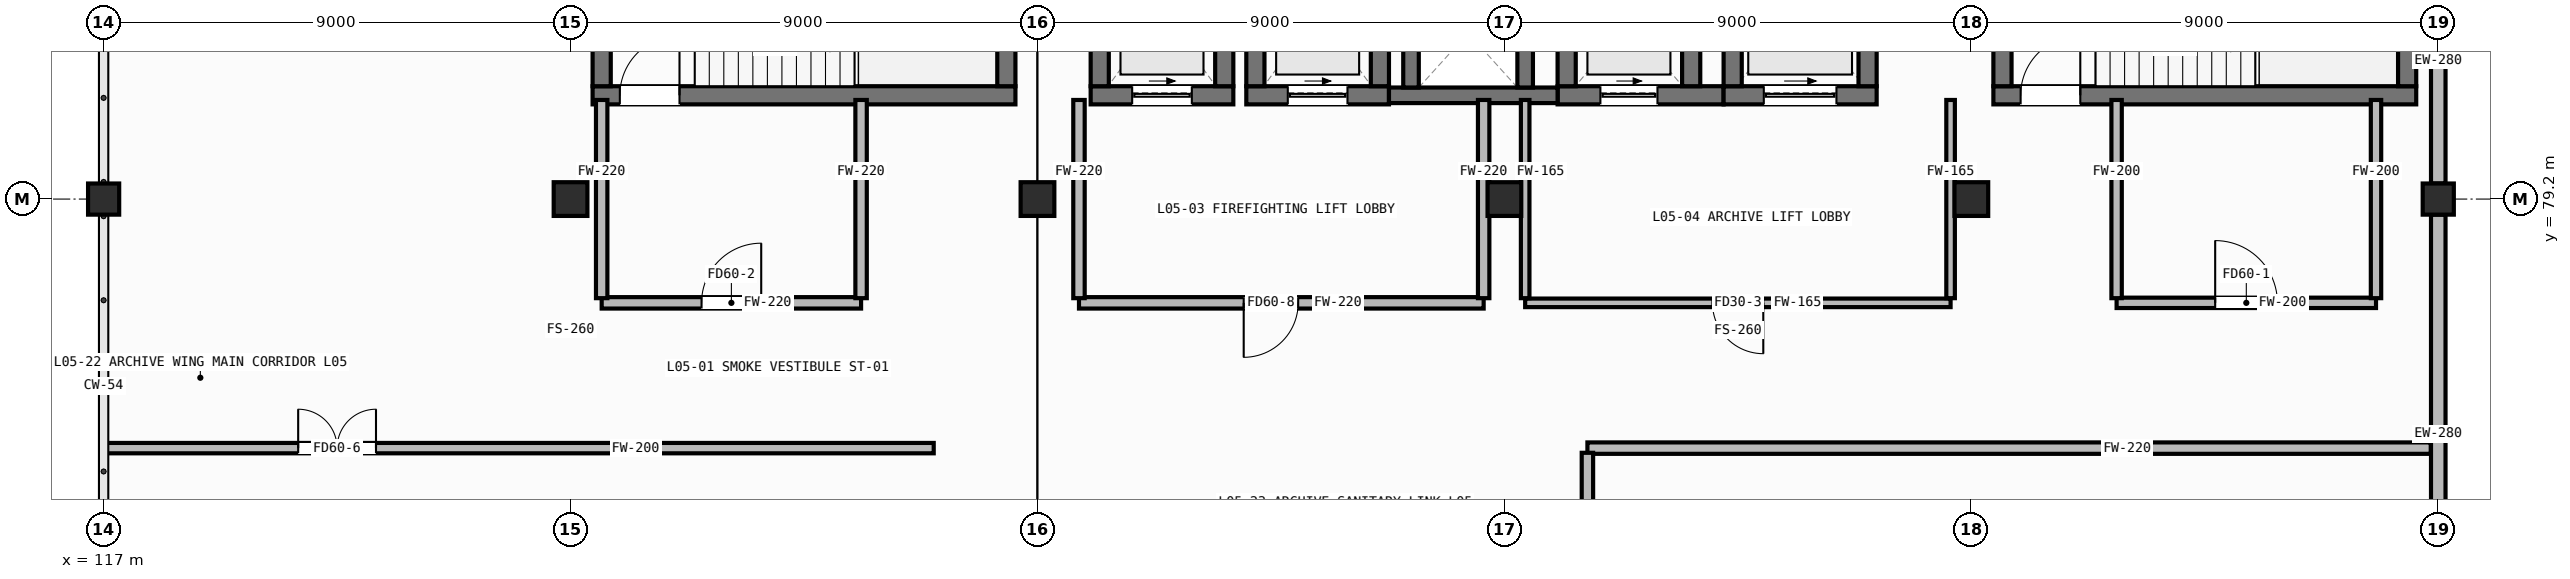
"""IFC4 building model, lengths in metres.
Left out: names, types, materials, properties, quantities, classifications, styles, units other than length and angle.
Written with IfcOpenShell. Run it as: python <this file> out.ifc"""

import sys

from ifc_helpers import new_model, si_unit, direction, frame, frame_2d, origin, origin_2d, place, context, subcontext, project, spatial, rectangle, hollow_rectangle, extrude, element, fill, save


model = new_model("IFC4")
c1 = context("Model", 3, precision=1e-05, world=origin(), true_north=direction((0.0, 1.0)))
c2 = subcontext(c1, "Body", "Model", "MODEL_VIEW")
j1 = project(units=[si_unit("LENGTHUNIT", "METRE"), si_unit("PLANEANGLEUNIT", "RADIAN")], contexts=[c1])
p1 = place(None, origin())
s1 = spatial("IfcSite", under=j1, at=p1, CompositionType="ELEMENT")
p2 = place(p1, origin())
s2 = spatial("IfcBuilding", under=s1, at=p2, CompositionType="ELEMENT")
p3 = place(p2, frame((0.0, 0.0, 17.0)))
s3 = spatial("IfcBuildingStorey", under=s2, at=p3, CompositionType="ELEMENT", Elevation=17.0)
p4 = place(p3, frame((117.0, 79.2, 0.0), z_axis=(0.0, 0.0, 1.0), x_axis=(1.0, 0.0, 0.0)))
e1 = element("IfcColumn", 1, at=p4, inside=s3, PredefinedType="COLUMN", context=c2, shape_type="SweptSolid", body=[
    extrude(hollow_rectangle(XDim=0.6, YDim=0.6, WallThickness=0.025, at=origin_2d()), origin(), (0.0, 0.0, 1.0), 3.6),
])
for number, where, z_axis, x_axis in (
    (2, (126.0, 79.2, 0.0), (0.0, 0.0, 1.0), (1.0, 0.0, 0.0)),
    (3, (135.0, 79.2, 0.0), (0.0, 0.0, 1.0), (1.0, 0.0, 0.0)),
    (4, (144.0, 79.2, 0.0), (0.0, 0.0, 1.0), (1.0, 0.0, 0.0)),
    (5, (153.0, 79.2, 0.0), (0.0, 0.0, 1.0), (1.0, 0.0, 0.0)),
):
    element("IfcColumn", number, at=place(p3, frame(where, z_axis=z_axis, x_axis=x_axis)), inside=s3, PredefinedType="COLUMN", context=c2, shape_type="SweptSolid", body=[
        extrude(hollow_rectangle(XDim=0.65, YDim=0.65, WallThickness=0.025, at=origin_2d()), origin(), (0.0, 0.0, 1.0), 3.6),
    ])
p5 = place(p3, frame((162.0, 79.2, 0.0), z_axis=(0.0, 0.0, 1.0), x_axis=(1.0, 0.0, 0.0)))
e6 = element("IfcColumn", 6, at=p5, inside=s3, PredefinedType="COLUMN", context=c2, shape_type="SweptSolid", body=[
    extrude(hollow_rectangle(XDim=0.6, YDim=0.6, WallThickness=0.025, at=origin_2d()), origin(), (0.0, 0.0, 1.0), 3.6),
])
p6 = place(p3, frame((162.0, 78.9, 0.0), z_axis=(0.0, 0.0, 1.0), x_axis=(0.0, -1.0, 0.0)))
e7 = element("IfcWall", 7, at=p6, inside=s3, PredefinedType="STANDARD", context=c2, shape_type="SweptSolid", body=[
    extrude(rectangle(XDim=6.6, YDim=0.28, at=frame_2d((3.3, 0.0))), origin(), (0.0, 0.0, 1.0), 2.94),
])
p7 = place(p3, frame((162.0, 86.1, 0.0), z_axis=(0.0, 0.0, 1.0), x_axis=(0.0, -1.0, 0.0)))
e8 = element("IfcWall", 8, at=p7, inside=s3, PredefinedType="STANDARD", context=c2, shape_type="SweptSolid", body=[
    extrude(rectangle(XDim=6.6, YDim=0.28, at=frame_2d((3.3, 0.0))), origin(), (0.0, 0.0, 1.0), 2.94),
])
p8 = place(p3, frame((126.425, 81.2, 0.0), z_axis=(0.0, 0.0, 1.0), x_axis=(1.0, 0.0, 0.0)))
e9 = element("IfcWall", 9, at=p8, inside=s3, PredefinedType="SHEAR", context=c2, shape_type="SweptSolid", body=[
    extrude(rectangle(XDim=8.15, YDim=0.35, at=frame_2d((4.075, 0.0))), origin(), (0.0, 0.0, 1.0), 3.34),
])
p9 = place(p8, frame((0.525, 0.0, 0.0)))
e10 = element("IfcOpeningElement", 10, at=p9, cuts=e9, PredefinedType="OPENING", context=c2, shape_type="SweptSolid", body=[
    extrude(rectangle(XDim=1.15, YDim=2.1, at=frame_2d((0.575, 1.05))), frame((0.0, 0.187, 0.0), z_axis=(0.0, -1.0, 0.0), x_axis=(1.0, 0.0, 0.0)), (0.0, 0.0, 1.0), 0.374),
])
for number, where, z_axis, x_axis in (
    (11, (126.6, 81.375, 0.0), (0.0, 0.0, 1.0), (0.0, 1.0, 0.0)),
    (12, (134.4, 81.375, 0.0), (0.0, 0.0, 1.0), (0.0, 1.0, 0.0)),
):
    element("IfcWall", number, at=place(p3, frame(where, z_axis=z_axis, x_axis=x_axis)), inside=s3, PredefinedType="SHEAR", context=c2, shape_type="SweptSolid", body=[
        extrude(rectangle(XDim=3.55, YDim=0.35, at=frame_2d((1.775, 0.0))), origin(), (0.0, 0.0, 1.0), 3.34),
    ])
p10 = place(p3, frame((153.425, 81.2, 0.0), z_axis=(0.0, 0.0, 1.0), x_axis=(1.0, 0.0, 0.0)))
e13 = element("IfcWall", 13, at=p10, inside=s3, PredefinedType="SHEAR", context=c2, shape_type="SweptSolid", body=[
    extrude(rectangle(XDim=8.15, YDim=0.35, at=frame_2d((4.075, 0.0))), origin(), (0.0, 0.0, 1.0), 3.34),
])
p11 = place(p10, frame((0.525, 0.0, 0.0)))
e14 = element("IfcOpeningElement", 14, at=p11, cuts=e13, PredefinedType="OPENING", context=c2, shape_type="SweptSolid", body=[
    extrude(rectangle(XDim=1.15, YDim=2.1, at=frame_2d((0.575, 1.05))), frame((0.0, 0.187, 0.0), z_axis=(0.0, -1.0, 0.0), x_axis=(1.0, 0.0, 0.0)), (0.0, 0.0, 1.0), 0.374),
])
for number, where, z_axis, x_axis in (
    (15, (153.6, 81.375, 0.0), (0.0, 0.0, 1.0), (0.0, 1.0, 0.0)),
    (16, (161.4, 81.375, 0.0), (0.0, 0.0, 1.0), (0.0, 1.0, 0.0)),
):
    element("IfcWall", number, at=place(p3, frame(where, z_axis=z_axis, x_axis=x_axis)), inside=s3, PredefinedType="SHEAR", context=c2, shape_type="SweptSolid", body=[
        extrude(rectangle(XDim=3.55, YDim=0.35, at=frame_2d((1.775, 0.0))), origin(), (0.0, 0.0, 1.0), 3.34),
    ])
p12 = place(p3, frame((136.025, 81.2, 0.0), z_axis=(0.0, 0.0, 1.0), x_axis=(1.0, 0.0, 0.0)))
e17 = element("IfcWall", 17, at=p12, inside=s3, PredefinedType="SHEAR", context=c2, shape_type="SweptSolid", body=[
    extrude(rectangle(XDim=2.75, YDim=0.35, at=frame_2d((1.375, 0.0))), origin(), (0.0, 0.0, 1.0), 3.34),
])
p13 = place(p12, frame((0.8, 0.0, 0.0)))
e18 = element("IfcOpeningElement", 18, at=p13, cuts=e17, PredefinedType="OPENING", context=c2, shape_type="SweptSolid", body=[
    extrude(rectangle(XDim=1.15, YDim=2.12, at=frame_2d((0.575, 1.06))), frame((0.0, 0.187, 0.0), z_axis=(0.0, -1.0, 0.0), x_axis=(1.0, 0.0, 0.0)), (0.0, 0.0, 1.0), 0.374),
])
for number, where, z_axis, x_axis in (
    (19, (136.2, 81.375, 0.0), (0.0, 0.0, 1.0), (0.0, 1.0, 0.0)),
    (20, (138.6, 81.375, 0.0), (0.0, 0.0, 1.0), (0.0, 1.0, 0.0)),
):
    element("IfcWall", number, at=place(p3, frame(where, z_axis=z_axis, x_axis=x_axis)), inside=s3, PredefinedType="SHEAR", context=c2, shape_type="SweptSolid", body=[
        extrude(rectangle(XDim=2.85, YDim=0.35, at=frame_2d((1.425, 0.0))), origin(), (0.0, 0.0, 1.0), 3.34),
    ])
p14 = place(p3, frame((139.025, 81.2, 0.0), z_axis=(0.0, 0.0, 1.0), x_axis=(1.0, 0.0, 0.0)))
e21 = element("IfcWall", 21, at=p14, inside=s3, PredefinedType="SHEAR", context=c2, shape_type="SweptSolid", body=[
    extrude(rectangle(XDim=2.75, YDim=0.35, at=frame_2d((1.375, 0.0))), origin(), (0.0, 0.0, 1.0), 3.34),
])
p15 = place(p14, frame((0.8, 0.0, 0.0)))
e22 = element("IfcOpeningElement", 22, at=p15, cuts=e21, PredefinedType="OPENING", context=c2, shape_type="SweptSolid", body=[
    extrude(rectangle(XDim=1.15, YDim=2.12, at=frame_2d((0.575, 1.06))), frame((0.0, 0.187, 0.0), z_axis=(0.0, -1.0, 0.0), x_axis=(1.0, 0.0, 0.0)), (0.0, 0.0, 1.0), 0.374),
])
for number, where, z_axis, x_axis in (
    (23, (139.2, 81.375, 0.0), (0.0, 0.0, 1.0), (0.0, 1.0, 0.0)),
    (24, (141.6, 81.375, 0.0), (0.0, 0.0, 1.0), (0.0, 1.0, 0.0)),
):
    element("IfcWall", number, at=place(p3, frame(where, z_axis=z_axis, x_axis=x_axis)), inside=s3, PredefinedType="SHEAR", context=c2, shape_type="SweptSolid", body=[
        extrude(rectangle(XDim=2.85, YDim=0.35, at=frame_2d((1.425, 0.0))), origin(), (0.0, 0.0, 1.0), 3.34),
    ])
p16 = place(p3, frame((145.025, 81.2, 0.0), z_axis=(0.0, 0.0, 1.0), x_axis=(1.0, 0.0, 0.0)))
e25 = element("IfcWall", 25, at=p16, inside=s3, PredefinedType="SHEAR", context=c2, shape_type="SweptSolid", body=[
    extrude(rectangle(XDim=3.2, YDim=0.35, at=frame_2d((1.6, 0.0))), origin(), (0.0, 0.0, 1.0), 3.34),
])
p17 = place(p16, frame((0.825, 0.0, 0.0)))
e26 = element("IfcOpeningElement", 26, at=p17, cuts=e25, PredefinedType="OPENING", context=c2, shape_type="SweptSolid", body=[
    extrude(rectangle(XDim=1.1, YDim=2.1, at=frame_2d((0.55, 1.05))), frame((0.0, 0.187, 0.0), z_axis=(0.0, -1.0, 0.0), x_axis=(1.0, 0.0, 0.0)), (0.0, 0.0, 1.0), 0.374),
])
for number, where, z_axis, x_axis in (
    (27, (145.2, 81.375, 0.0), (0.0, 0.0, 1.0), (0.0, 1.0, 0.0)),
    (28, (147.6, 81.375, 0.0), (0.0, 0.0, 1.0), (0.0, 1.0, 0.0)),
):
    element("IfcWall", number, at=place(p3, frame(where, z_axis=z_axis, x_axis=x_axis)), inside=s3, PredefinedType="SHEAR", context=c2, shape_type="SweptSolid", body=[
        extrude(rectangle(XDim=2.45, YDim=0.35, at=frame_2d((1.225, 0.0))), origin(), (0.0, 0.0, 1.0), 3.34),
    ])
p18 = place(p3, frame((148.225, 81.2, 0.0), z_axis=(0.0, 0.0, 1.0), x_axis=(1.0, 0.0, 0.0)))
e29 = element("IfcWall", 29, at=p18, inside=s3, PredefinedType="SHEAR", context=c2, shape_type="SweptSolid", body=[
    extrude(rectangle(XDim=2.95, YDim=0.35, at=frame_2d((1.475, 0.0))), origin(), (0.0, 0.0, 1.0), 3.34),
])
p19 = place(p18, frame((0.775, 0.0, 0.0)))
e30 = element("IfcOpeningElement", 30, at=p19, cuts=e29, PredefinedType="OPENING", context=c2, shape_type="SweptSolid", body=[
    extrude(rectangle(XDim=1.4, YDim=2.15, at=frame_2d((0.7, 1.075))), frame((0.0, 0.187, 0.0), z_axis=(0.0, -1.0, 0.0), x_axis=(1.0, 0.0, 0.0)), (0.0, 0.0, 1.0), 0.374),
])
for number, where, z_axis, x_axis in (
    (31, (148.4, 81.375, 0.0), (0.0, 0.0, 1.0), (0.0, 1.0, 0.0)),
    (32, (151.0, 81.375, 0.0), (0.0, 0.0, 1.0), (0.0, 1.0, 0.0)),
):
    element("IfcWall", number, at=place(p3, frame(where, z_axis=z_axis, x_axis=x_axis)), inside=s3, PredefinedType="SHEAR", context=c2, shape_type="SweptSolid", body=[
        extrude(rectangle(XDim=3.05, YDim=0.35, at=frame_2d((1.525, 0.0))), origin(), (0.0, 0.0, 1.0), 3.34),
    ])
p20 = place(p3, frame((141.775, 81.2, 0.0), z_axis=(0.0, 0.0, 1.0), x_axis=(1.0, 0.0, 0.0)))
e33 = element("IfcWall", 33, at=p20, inside=s3, PredefinedType="SHEAR", context=c2, shape_type="SweptSolid", body=[
    extrude(rectangle(XDim=3.25, YDim=0.3, at=frame_2d((1.625, 0.0))), origin(), (0.0, 0.0, 1.0), 3.34),
])
for number, where, z_axis, x_axis in (
    (34, (142.2, 81.35, 0.0), (0.0, 0.0, 1.0), (0.0, 1.0, 0.0)),
    (35, (144.4, 81.35, 0.0), (0.0, 0.0, 1.0), (0.0, 1.0, 0.0)),
):
    element("IfcWall", number, at=place(p3, frame(where, z_axis=z_axis, x_axis=x_axis)), inside=s3, PredefinedType="SHEAR", context=c2, shape_type="SweptSolid", body=[
        extrude(rectangle(XDim=2.1, YDim=0.3, at=frame_2d((1.05, 0.0))), origin(), (0.0, 0.0, 1.0), 3.34),
    ])
p21 = place(p3, frame((126.6, 77.2, 0.0), z_axis=(0.0, 0.0, 1.0), x_axis=(1.0, 0.0, 0.0)))
e36 = element("IfcWall", 36, at=p21, inside=s3, PredefinedType="PARTITIONING", context=c2, shape_type="SweptSolid", body=[
    extrude(rectangle(XDim=5.0, YDim=0.22, at=frame_2d((2.5, 0.0))), origin(), (0.0, 0.0, 1.0), 3.34),
])
p22 = place(p21, frame((1.925, 0.0, 0.0)))
e37 = element("IfcOpeningElement", 37, at=p22, cuts=e36, PredefinedType="OPENING", context=c2, shape_type="SweptSolid", body=[
    extrude(rectangle(XDim=1.15, YDim=2.1, at=frame_2d((0.575, 1.05))), frame((0.0, 0.122, 0.0), z_axis=(0.0, -1.0, 0.0), x_axis=(1.0, 0.0, 0.0)), (0.0, 0.0, 1.0), 0.244),
])
for number, where, z_axis, x_axis in (
    (38, (126.6, 77.29, 0.0), (0.0, 0.0, 1.0), (0.0, 1.0, 0.0)),
    (39, (131.6, 77.29, 0.0), (0.0, 0.0, 1.0), (0.0, 1.0, 0.0)),
):
    element("IfcWall", number, at=place(p3, frame(where, z_axis=z_axis, x_axis=x_axis)), inside=s3, PredefinedType="PARTITIONING", context=c2, shape_type="SweptSolid", body=[
        extrude(rectangle(XDim=3.82, YDim=0.22, at=frame_2d((1.91, 0.0))), origin(), (0.0, 0.0, 1.0), 3.34),
    ])
p23 = place(p3, frame((155.8, 77.2, 0.0), z_axis=(0.0, 0.0, 1.0), x_axis=(1.0, 0.0, 0.0)))
e40 = element("IfcWall", 40, at=p23, inside=s3, PredefinedType="PARTITIONING", context=c2, shape_type="SweptSolid", body=[
    extrude(rectangle(XDim=5.0, YDim=0.2, at=frame_2d((2.5, 0.0))), origin(), (0.0, 0.0, 1.0), 3.34),
])
p24 = place(p23, frame((1.9, 0.0, 0.0)))
e41 = element("IfcOpeningElement", 41, at=p24, cuts=e40, PredefinedType="OPENING", context=c2, shape_type="SweptSolid", body=[
    extrude(rectangle(XDim=1.2, YDim=2.1, at=frame_2d((0.6, 1.05))), frame((0.0, 0.112, 0.0), z_axis=(0.0, -1.0, 0.0), x_axis=(1.0, 0.0, 0.0)), (0.0, 0.0, 1.0), 0.224),
])
for number, where, z_axis, x_axis in (
    (42, (155.8, 77.29, 0.0), (0.0, 0.0, 1.0), (0.0, 1.0, 0.0)),
    (43, (160.8, 77.29, 0.0), (0.0, 0.0, 1.0), (0.0, 1.0, 0.0)),
):
    element("IfcWall", number, at=place(p3, frame(where, z_axis=z_axis, x_axis=x_axis)), inside=s3, PredefinedType="PARTITIONING", context=c2, shape_type="SweptSolid", body=[
        extrude(rectangle(XDim=3.82, YDim=0.2, at=frame_2d((1.91, 0.0))), origin(), (0.0, 0.0, 1.0), 3.34),
    ])
p25 = place(p3, frame((135.8, 77.2, 0.0), z_axis=(0.0, 0.0, 1.0), x_axis=(1.0, 0.0, 0.0)))
e44 = element("IfcWall", 44, at=p25, inside=s3, PredefinedType="PARTITIONING", context=c2, shape_type="SweptSolid", body=[
    extrude(rectangle(XDim=7.8, YDim=0.22, at=frame_2d((3.9, 0.0))), origin(), (0.0, 0.0, 1.0), 3.34),
])
p26 = place(p25, frame((3.175, 0.0, 0.0)))
e45 = element("IfcOpeningElement", 45, at=p26, cuts=e44, PredefinedType="OPENING", context=c2, shape_type="SweptSolid", body=[
    extrude(rectangle(XDim=1.05, YDim=2.02, at=frame_2d((0.525, 1.01))), frame((0.0, 0.122, 0.0), z_axis=(0.0, -1.0, 0.0), x_axis=(1.0, 0.0, 0.0)), (0.0, 0.0, 1.0), 0.244),
])
for number, where, z_axis, x_axis in (
    (46, (135.8, 77.29, 0.0), (0.0, 0.0, 1.0), (0.0, 1.0, 0.0)),
    (47, (143.6, 77.29, 0.0), (0.0, 0.0, 1.0), (0.0, 1.0, 0.0)),
):
    element("IfcWall", number, at=place(p3, frame(where, z_axis=z_axis, x_axis=x_axis)), inside=s3, PredefinedType="PARTITIONING", context=c2, shape_type="SweptSolid", body=[
        extrude(rectangle(XDim=3.82, YDim=0.22, at=frame_2d((1.91, 0.0))), origin(), (0.0, 0.0, 1.0), 3.34),
    ])
p27 = place(p3, frame((144.4, 77.2, 0.0), z_axis=(0.0, 0.0, 1.0), x_axis=(1.0, 0.0, 0.0)))
e48 = element("IfcWall", 48, at=p27, inside=s3, PredefinedType="PARTITIONING", context=c2, shape_type="SweptSolid", body=[
    extrude(rectangle(XDim=8.2, YDim=0.165, at=frame_2d((4.1, 0.0))), origin(), (0.0, 0.0, 1.0), 3.34),
])
p28 = place(p27, frame((3.61, 0.0, 0.0)))
e49 = element("IfcOpeningElement", 49, at=p28, cuts=e48, PredefinedType="OPENING", context=c2, shape_type="SweptSolid", body=[
    extrude(rectangle(XDim=0.98, YDim=2.02, at=frame_2d((0.49, 1.01))), frame((0.0, 0.094, 0.0), z_axis=(0.0, -1.0, 0.0), x_axis=(1.0, 0.0, 0.0)), (0.0, 0.0, 1.0), 0.189),
])
for number, where, z_axis, x_axis in (
    (50, (144.4, 77.29, 0.0), (0.0, 0.0, 1.0), (0.0, 1.0, 0.0)),
    (51, (152.6, 77.29, 0.0), (0.0, 0.0, 1.0), (0.0, 1.0, 0.0)),
):
    element("IfcWall", number, at=place(p3, frame(where, z_axis=z_axis, x_axis=x_axis)), inside=s3, PredefinedType="PARTITIONING", context=c2, shape_type="SweptSolid", body=[
        extrude(rectangle(XDim=3.82, YDim=0.165, at=frame_2d((1.91, 0.0))), origin(), (0.0, 0.0, 1.0), 3.34),
    ])
p29 = place(p3, frame((117.035, 74.4, 0.0), z_axis=(0.0, 0.0, 1.0), x_axis=(1.0, 0.0, 0.0)))
e52 = element("IfcWall", 52, at=p29, inside=s3, PredefinedType="PARTITIONING", context=c2, shape_type="SweptSolid", body=[
    extrude(rectangle(XDim=15.965, YDim=0.2, at=frame_2d((7.982, 0.0))), origin(), (0.0, 0.0, 1.0), 3.34),
])
p30 = place(p29, frame((3.715, 0.0, 0.0)))
e53 = element("IfcOpeningElement", 53, at=p30, cuts=e52, PredefinedType="OPENING", context=c2, shape_type="SweptSolid", body=[
    extrude(rectangle(XDim=1.5, YDim=2.1, at=frame_2d((0.75, 1.05))), frame((0.0, 0.112, 0.0), z_axis=(0.0, -1.0, 0.0), x_axis=(1.0, 0.0, 0.0)), (0.0, 0.0, 1.0), 0.224),
])
p31 = place(p3, frame((145.6, 74.4, 0.0), z_axis=(0.0, 0.0, 1.0), x_axis=(1.0, 0.0, 0.0)))
e54 = element("IfcWall", 54, at=p31, inside=s3, PredefinedType="PARTITIONING", context=c2, shape_type="SweptSolid", body=[
    extrude(rectangle(XDim=16.255, YDim=0.22, at=frame_2d((8.127, 0.0))), origin(), (0.0, 0.0, 1.0), 3.34),
])
p32 = place(p3, frame((145.6, 50.435, 0.0), z_axis=(0.0, 0.0, 1.0), x_axis=(0.0, 1.0, 0.0)))
e55 = element("IfcWall", 55, at=p32, inside=s3, PredefinedType="PARTITIONING", context=c2, shape_type="SweptSolid", body=[
    extrude(rectangle(XDim=23.875, YDim=0.22, at=frame_2d((11.938, 0.0))), origin(), (0.0, 0.0, 1.0), 3.34),
])
p33 = place(p32, frame((15.165, 0.0, 0.0)))
e56 = element("IfcOpeningElement", 56, at=p33, cuts=e55, PredefinedType="OPENING", context=c2, shape_type="SweptSolid", body=[
    extrude(rectangle(XDim=1.6, YDim=2.12, at=frame_2d((0.8, 1.06))), frame((0.0, 0.122, 0.0), z_axis=(0.0, -1.0, 0.0), x_axis=(1.0, 0.0, 0.0)), (0.0, 0.0, 1.0), 0.244),
])
p34 = place(p9, origin())
e57 = element("IfcDoor", 57, at=p34, inside=s3, OperationType="SINGLE_SWING_RIGHT", PredefinedType="DOOR", context=c2, shape_type="SweptSolid", body=[
    extrude(rectangle(XDim=1.15, YDim=2.1, at=frame_2d((0.575, 1.05))), frame((0.0, 0.025, 0.0), z_axis=(0.0, -1.0, 0.0), x_axis=(1.0, 0.0, 0.0)), (0.0, 0.0, 1.0), 0.05),
])
fill(e10, e57)
p35 = place(p11, origin())
e58 = element("IfcDoor", 58, at=p35, inside=s3, OperationType="SINGLE_SWING_RIGHT", PredefinedType="DOOR", context=c2, shape_type="SweptSolid", body=[
    extrude(rectangle(XDim=1.15, YDim=2.1, at=frame_2d((0.575, 1.05))), frame((0.0, 0.025, 0.0), z_axis=(0.0, -1.0, 0.0), x_axis=(1.0, 0.0, 0.0)), (0.0, 0.0, 1.0), 0.05),
])
fill(e14, e58)
p36 = place(p13, origin())
e59 = element("IfcDoor", 59, at=p36, inside=s3, OperationType="SLIDING_TO_LEFT", PredefinedType="DOOR", context=c2, shape_type="SweptSolid", body=[
    extrude(rectangle(XDim=1.15, YDim=2.12, at=frame_2d((0.575, 1.06))), frame((0.0, 0.025, 0.0), z_axis=(0.0, -1.0, 0.0), x_axis=(1.0, 0.0, 0.0)), (0.0, 0.0, 1.0), 0.05),
])
fill(e18, e59)
p37 = place(p15, origin())
e60 = element("IfcDoor", 60, at=p37, inside=s3, OperationType="SLIDING_TO_LEFT", PredefinedType="DOOR", context=c2, shape_type="SweptSolid", body=[
    extrude(rectangle(XDim=1.15, YDim=2.12, at=frame_2d((0.575, 1.06))), frame((0.0, 0.025, 0.0), z_axis=(0.0, -1.0, 0.0), x_axis=(1.0, 0.0, 0.0)), (0.0, 0.0, 1.0), 0.05),
])
fill(e22, e60)
p38 = place(p17, origin())
e61 = element("IfcDoor", 61, at=p38, inside=s3, OperationType="SLIDING_TO_LEFT", PredefinedType="DOOR", context=c2, shape_type="SweptSolid", body=[
    extrude(rectangle(XDim=1.1, YDim=2.1, at=frame_2d((0.55, 1.05))), frame((0.0, 0.025, 0.0), z_axis=(0.0, -1.0, 0.0), x_axis=(1.0, 0.0, 0.0)), (0.0, 0.0, 1.0), 0.05),
])
fill(e26, e61)
p39 = place(p19, origin())
e62 = element("IfcDoor", 62, at=p39, inside=s3, OperationType="SLIDING_TO_LEFT", PredefinedType="DOOR", context=c2, shape_type="SweptSolid", body=[
    extrude(rectangle(XDim=1.4, YDim=2.15, at=frame_2d((0.7, 1.075))), frame((0.0, 0.025, 0.0), z_axis=(0.0, -1.0, 0.0), x_axis=(1.0, 0.0, 0.0)), (0.0, 0.0, 1.0), 0.05),
])
fill(e30, e62)
p40 = place(p22, origin())
e63 = element("IfcDoor", 63, at=p40, inside=s3, OperationType="SINGLE_SWING_RIGHT", PredefinedType="DOOR", context=c2, shape_type="SweptSolid", body=[
    extrude(rectangle(XDim=1.15, YDim=2.1, at=frame_2d((0.575, 1.05))), frame((0.0, 0.025, 0.0), z_axis=(0.0, -1.0, 0.0), x_axis=(1.0, 0.0, 0.0)), (0.0, 0.0, 1.0), 0.05),
])
fill(e37, e63)
p41 = place(p24, origin())
e64 = element("IfcDoor", 64, at=p41, inside=s3, OperationType="SINGLE_SWING_LEFT", PredefinedType="DOOR", context=c2, shape_type="SweptSolid", body=[
    extrude(rectangle(XDim=1.2, YDim=2.1, at=frame_2d((0.6, 1.05))), frame((0.0, 0.025, 0.0), z_axis=(0.0, -1.0, 0.0), x_axis=(1.0, 0.0, 0.0)), (0.0, 0.0, 1.0), 0.05),
])
fill(e41, e64)
p42 = place(p26, frame((1.05, 0.0, 0.0), z_axis=(0.0, 0.0, 1.0), x_axis=(-1.0, 0.0, 0.0)))
e65 = element("IfcDoor", 65, at=p42, inside=s3, OperationType="SINGLE_SWING_RIGHT", PredefinedType="DOOR", context=c2, shape_type="SweptSolid", body=[
    extrude(rectangle(XDim=1.05, YDim=2.02, at=frame_2d((0.525, 1.01))), frame((0.0, 0.025, 0.0), z_axis=(0.0, -1.0, 0.0), x_axis=(1.0, 0.0, 0.0)), (0.0, 0.0, 1.0), 0.05),
])
fill(e45, e65)
p43 = place(p28, frame((0.98, 0.0, 0.0), z_axis=(0.0, 0.0, 1.0), x_axis=(-1.0, 0.0, 0.0)))
e66 = element("IfcDoor", 66, at=p43, inside=s3, OperationType="SINGLE_SWING_LEFT", PredefinedType="DOOR", context=c2, shape_type="SweptSolid", body=[
    extrude(rectangle(XDim=0.98, YDim=2.02, at=frame_2d((0.49, 1.01))), frame((0.0, 0.025, 0.0), z_axis=(0.0, -1.0, 0.0), x_axis=(1.0, 0.0, 0.0)), (0.0, 0.0, 1.0), 0.05),
])
fill(e49, e66)
p44 = place(p30, origin())
e67 = element("IfcDoor", 67, at=p44, inside=s3, OperationType="DOUBLE_DOOR_SINGLE_SWING", PredefinedType="DOOR", context=c2, shape_type="SweptSolid", body=[
    extrude(rectangle(XDim=1.5, YDim=2.1, at=frame_2d((0.75, 1.05))), frame((0.0, 0.025, 0.0), z_axis=(0.0, -1.0, 0.0), x_axis=(1.0, 0.0, 0.0)), (0.0, 0.0, 1.0), 0.05),
])
fill(e53, e67)
save(model, sys.argv[1])
